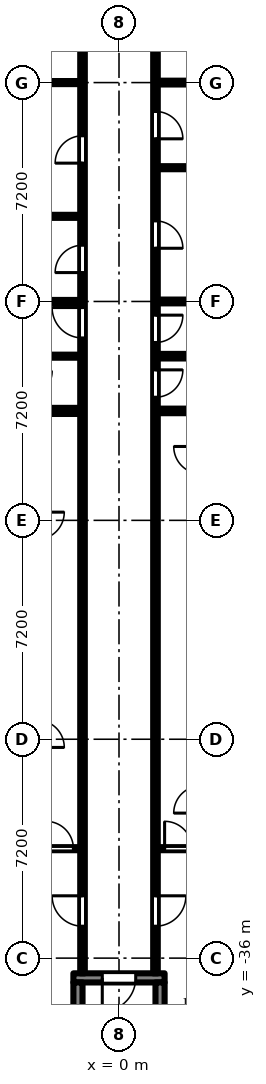
"""IFC4 building model, lengths in metres.
Left out: names, types, materials, properties, quantities, classifications, styles, units other than length and angle.
Written with IfcOpenShell. Run it as: python <this file> out.ifc"""

import sys

from ifc_helpers import new_model, si_unit, direction, frame, frame_2d, origin, place, context, subcontext, project, spatial, rectangle, extrude, element, fill, save


model = new_model("IFC4")
c1 = context("Model", 3, precision=1e-05, world=origin(), true_north=direction((0.0, 1.0)))
c2 = subcontext(c1, "Body", "Model", "MODEL_VIEW")
j1 = project(units=[si_unit("LENGTHUNIT", "METRE"), si_unit("PLANEANGLEUNIT", "RADIAN")], contexts=[c1])
p1 = place(None, origin())
s1 = spatial("IfcSite", under=j1, at=p1, CompositionType="ELEMENT")
p2 = place(p1, origin())
s2 = spatial("IfcBuilding", under=s1, at=p2, CompositionType="ELEMENT")
p3 = place(p2, frame((0.0, 0.0, 53.7)))
s3 = spatial("IfcBuildingStorey", under=s2, at=p3, CompositionType="ELEMENT", Elevation=53.7)
p4 = place(p3, frame((-1.5, -36.65, 0.0), z_axis=(0.0, 0.0, 1.0), x_axis=(1.0, 0.0, 0.0)))
e1 = element("IfcWall", 1, at=p4, inside=s3, PredefinedType="SHEAR", context=c2, shape_type="SweptSolid", body=[
    extrude(rectangle(XDim=3.0, YDim=0.3, at=frame_2d((1.5, 0.0))), origin(), (0.0, 0.0, 1.0), 2.575),
])
p5 = place(p4, frame((0.95, 0.0, 0.0)))
e2 = element("IfcOpeningElement", 2, at=p5, cuts=e1, PredefinedType="OPENING", context=c2, shape_type="SweptSolid", body=[
    extrude(rectangle(XDim=1.1, YDim=2.1, at=frame_2d((0.55, 1.05))), frame((0.0, 0.16, 0.0), z_axis=(0.0, -1.0, 0.0), x_axis=(1.0, 0.0, 0.0)), (0.0, 0.0, 1.0), 0.32),
])
for number, where, z_axis, x_axis in (
    (3, (-1.35, -36.8, 0.0), (0.0, 0.0, 1.0), (0.0, -1.0, 0.0)),
    (4, (1.35, -36.8, 0.0), (0.0, 0.0, 1.0), (0.0, -1.0, 0.0)),
):
    element("IfcWall", number, at=place(p3, frame(where, z_axis=z_axis, x_axis=x_axis)), inside=s3, PredefinedType="SHEAR", context=c2, shape_type="SweptSolid", body=[
        extrude(rectangle(XDim=5.8, YDim=0.3, at=frame_2d((2.9, 0.0))), origin(), (0.0, 0.0, 1.0), 2.575),
    ])
p6 = place(p3, frame((-6.9, -32.4, 0.0), z_axis=(0.0, 0.0, 1.0), x_axis=(1.0, 0.0, 0.0)))
e5 = element("IfcWall", 5, at=p6, inside=s3, PredefinedType="PARTITIONING", context=c2, shape_type="SweptSolid", body=[
    extrude(rectangle(XDim=5.625, YDim=0.1, at=frame_2d((2.812, 0.0))), origin(), (0.0, 0.0, 1.0), 2.575),
])
p7 = place(p6, frame((4.5, 0.0, 0.0)))
e6 = element("IfcOpeningElement", 6, at=p7, cuts=e5, PredefinedType="OPENING", context=c2, shape_type="SweptSolid", body=[
    extrude(rectangle(XDim=0.9, YDim=2.1, at=frame_2d((0.45, 1.05))), frame((0.0, 0.06, 0.0), z_axis=(0.0, -1.0, 0.0), x_axis=(1.0, 0.0, 0.0)), (0.0, 0.0, 1.0), 0.12),
])
for number, where, z_axis, x_axis in (
    (7, (-3.9, -14.4, 0.0), (0.0, 0.0, 1.0), (1.0, 0.0, 0.0)),
    (8, (-3.9, -11.6, 0.0), (0.0, 0.0, 1.0), (1.0, 0.0, 0.0)),
    (9, (-3.9, -7.2, 0.0), (0.0, 0.0, 1.0), (1.0, 0.0, 0.0)),
):
    element("IfcWall", number, at=place(p3, frame(where, z_axis=z_axis, x_axis=x_axis)), inside=s3, PredefinedType="PARTITIONING", context=c2, shape_type="SweptSolid", body=[
        extrude(rectangle(XDim=2.625, YDim=0.1, at=frame_2d((1.312, 0.0))), origin(), (0.0, 0.0, 1.0), 2.575),
    ])
p8 = place(p3, frame((-2.95, -16.2, 0.0), z_axis=(0.0, 0.0, 1.0), x_axis=(1.0, 0.0, 0.0)))
e10 = element("IfcWall", 10, at=p8, inside=s3, PredefinedType="PARTITIONING", context=c2, shape_type="SweptSolid", body=[
    extrude(rectangle(XDim=1.675, YDim=0.1, at=frame_2d((0.837, 0.0))), origin(), (0.0, 0.0, 1.0), 2.575),
])
p9 = place(p3, frame((-2.75, -18.0, 0.0), z_axis=(0.0, 0.0, 1.0), x_axis=(1.0, 0.0, 0.0)))
e11 = element("IfcWall", 11, at=p9, inside=s3, PredefinedType="PARTITIONING", context=c2, shape_type="SweptSolid", body=[
    extrude(rectangle(XDim=1.475, YDim=0.2, at=frame_2d((0.738, 0.0))), origin(), (0.0, 0.0, 1.0), 2.575),
])
p10 = place(p3, frame((-1.2, -36.5, 0.0), z_axis=(0.0, 0.0, 1.0), x_axis=(0.0, 1.0, 0.0)))
e12 = element("IfcWall", 12, at=p10, inside=s3, PredefinedType="PARTITIONING", context=c2, shape_type="SweptSolid", body=[
    extrude(rectangle(XDim=35.225, YDim=0.15, at=frame_2d((17.613, 0.0))), origin(), (0.0, 0.0, 1.0), 2.575),
])
p11 = place(p10, frame((31.85, 0.0, 0.0)))
e13 = element("IfcOpeningElement", 13, at=p11, cuts=e12, PredefinedType="OPENING", context=c2, shape_type="SweptSolid", body=[
    extrude(rectangle(XDim=0.9, YDim=2.1, at=frame_2d((0.45, 1.05))), frame((0.0, 0.085, 0.0), z_axis=(0.0, -1.0, 0.0), x_axis=(1.0, 0.0, 0.0)), (0.0, 0.0, 1.0), 0.17),
])
p12 = place(p10, frame((23.05, 0.0, 0.0)))
e14 = element("IfcOpeningElement", 14, at=p12, cuts=e12, PredefinedType="OPENING", context=c2, shape_type="SweptSolid", body=[
    extrude(rectangle(XDim=0.9, YDim=2.1, at=frame_2d((0.45, 1.05))), frame((0.0, 0.085, 0.0), z_axis=(0.0, -1.0, 0.0), x_axis=(1.0, 0.0, 0.0)), (0.0, 0.0, 1.0), 0.17),
])
p13 = place(p10, frame((26.65, 0.0, 0.0)))
e15 = element("IfcOpeningElement", 15, at=p13, cuts=e12, PredefinedType="OPENING", context=c2, shape_type="SweptSolid", body=[
    extrude(rectangle(XDim=0.9, YDim=2.1, at=frame_2d((0.45, 1.05))), frame((0.0, 0.085, 0.0), z_axis=(0.0, -1.0, 0.0), x_axis=(1.0, 0.0, 0.0)), (0.0, 0.0, 1.0), 0.17),
])
p14 = place(p10, frame((20.9, 0.0, 0.0)))
e16 = element("IfcOpeningElement", 16, at=p14, cuts=e12, PredefinedType="OPENING", context=c2, shape_type="SweptSolid", body=[
    extrude(rectangle(XDim=1.0, YDim=2.1, at=frame_2d((0.5, 1.05))), frame((0.0, 0.085, 0.0), z_axis=(0.0, -1.0, 0.0), x_axis=(1.0, 0.0, 0.0)), (0.0, 0.0, 1.0), 0.17),
])
p15 = place(p10, frame((1.55, 0.0, 0.0)))
e17 = element("IfcOpeningElement", 17, at=p15, cuts=e12, PredefinedType="OPENING", context=c2, shape_type="SweptSolid", body=[
    extrude(rectangle(XDim=1.0, YDim=2.1, at=frame_2d((0.5, 1.05))), frame((0.0, 0.085, 0.0), z_axis=(0.0, -1.0, 0.0), x_axis=(1.0, 0.0, 0.0)), (0.0, 0.0, 1.0), 0.17),
])
p16 = place(p3, frame((1.2, -36.5, 0.0), z_axis=(0.0, 0.0, 1.0), x_axis=(0.0, 1.0, 0.0)))
e18 = element("IfcWall", 18, at=p16, inside=s3, PredefinedType="PARTITIONING", context=c2, shape_type="SweptSolid", body=[
    extrude(rectangle(XDim=35.375, YDim=0.15, at=frame_2d((17.688, 0.0))), origin(), (0.0, 0.0, 1.0), 2.575),
])
p17 = place(p16, frame((33.65, 0.0, 0.0)))
e19 = element("IfcOpeningElement", 19, at=p17, cuts=e18, PredefinedType="OPENING", context=c2, shape_type="SweptSolid", body=[
    extrude(rectangle(XDim=0.9, YDim=2.1, at=frame_2d((0.45, 1.05))), frame((0.0, 0.085, 0.0), z_axis=(0.0, -1.0, 0.0), x_axis=(1.0, 0.0, 0.0)), (0.0, 0.0, 1.0), 0.17),
])
p18 = place(p16, frame((30.65, 0.0, 0.0)))
e20 = element("IfcOpeningElement", 20, at=p18, cuts=e18, PredefinedType="OPENING", context=c2, shape_type="SweptSolid", body=[
    extrude(rectangle(XDim=0.9, YDim=2.1, at=frame_2d((0.45, 1.05))), frame((0.0, 0.085, 0.0), z_axis=(0.0, -1.0, 0.0), x_axis=(1.0, 0.0, 0.0)), (0.0, 0.0, 1.0), 0.17),
])
p19 = place(p16, frame((27.45, 0.0, 0.0)))
e21 = element("IfcOpeningElement", 21, at=p19, cuts=e18, PredefinedType="OPENING", context=c2, shape_type="SweptSolid", body=[
    extrude(rectangle(XDim=0.9, YDim=2.1, at=frame_2d((0.45, 1.05))), frame((0.0, 0.085, 0.0), z_axis=(0.0, -1.0, 0.0), x_axis=(1.0, 0.0, 0.0)), (0.0, 0.0, 1.0), 0.17),
])
p20 = place(p16, frame((23.85, 0.0, 0.0)))
e22 = element("IfcOpeningElement", 22, at=p20, cuts=e18, PredefinedType="OPENING", context=c2, shape_type="SweptSolid", body=[
    extrude(rectangle(XDim=0.9, YDim=2.1, at=frame_2d((0.45, 1.05))), frame((0.0, 0.085, 0.0), z_axis=(0.0, -1.0, 0.0), x_axis=(1.0, 0.0, 0.0)), (0.0, 0.0, 1.0), 0.17),
])
p21 = place(p16, frame((20.75, 0.0, 0.0)))
e23 = element("IfcOpeningElement", 23, at=p21, cuts=e18, PredefinedType="OPENING", context=c2, shape_type="SweptSolid", body=[
    extrude(rectangle(XDim=0.9, YDim=2.1, at=frame_2d((0.45, 1.05))), frame((0.0, 0.085, 0.0), z_axis=(0.0, -1.0, 0.0), x_axis=(1.0, 0.0, 0.0)), (0.0, 0.0, 1.0), 0.17),
])
p22 = place(p16, frame((18.95, 0.0, 0.0)))
e24 = element("IfcOpeningElement", 24, at=p22, cuts=e18, PredefinedType="OPENING", context=c2, shape_type="SweptSolid", body=[
    extrude(rectangle(XDim=0.9, YDim=2.1, at=frame_2d((0.45, 1.05))), frame((0.0, 0.085, 0.0), z_axis=(0.0, -1.0, 0.0), x_axis=(1.0, 0.0, 0.0)), (0.0, 0.0, 1.0), 0.17),
])
p23 = place(p16, frame((1.55, 0.0, 0.0)))
e25 = element("IfcOpeningElement", 25, at=p23, cuts=e18, PredefinedType="OPENING", context=c2, shape_type="SweptSolid", body=[
    extrude(rectangle(XDim=1.0, YDim=2.1, at=frame_2d((0.5, 1.05))), frame((0.0, 0.085, 0.0), z_axis=(0.0, -1.0, 0.0), x_axis=(1.0, 0.0, 0.0)), (0.0, 0.0, 1.0), 0.17),
])
p24 = place(p3, frame((1.275, -32.4, 0.0), z_axis=(0.0, 0.0, 1.0), x_axis=(1.0, 0.0, 0.0)))
e26 = element("IfcWall", 26, at=p24, inside=s3, PredefinedType="PARTITIONING", context=c2, shape_type="SweptSolid", body=[
    extrude(rectangle(XDim=5.625, YDim=0.1, at=frame_2d((2.812, 0.0))), origin(), (0.0, 0.0, 1.0), 2.575),
])
p25 = place(p24, frame((0.225, 0.0, 0.0)))
e27 = element("IfcOpeningElement", 27, at=p25, cuts=e26, PredefinedType="OPENING", context=c2, shape_type="SweptSolid", body=[
    extrude(rectangle(XDim=0.9, YDim=2.1, at=frame_2d((0.45, 1.05))), frame((0.0, 0.06, 0.0), z_axis=(0.0, -1.0, 0.0), x_axis=(1.0, 0.0, 0.0)), (0.0, 0.0, 1.0), 0.12),
])
for number, where, z_axis, x_axis in (
    (28, (1.275, -18.0, 0.0), (0.0, 0.0, 1.0), (1.0, 0.0, 0.0)),
    (29, (1.275, -16.2, 0.0), (0.0, 0.0, 1.0), (1.0, 0.0, 0.0)),
):
    element("IfcWall", number, at=place(p3, frame(where, z_axis=z_axis, x_axis=x_axis)), inside=s3, PredefinedType="PARTITIONING", context=c2, shape_type="SweptSolid", body=[
        extrude(rectangle(XDim=5.625, YDim=0.15, at=frame_2d((2.812, 0.0))), origin(), (0.0, 0.0, 1.0), 2.575),
    ])
p26 = place(p3, frame((1.275, -14.4, 0.0), z_axis=(0.0, 0.0, 1.0), x_axis=(1.0, 0.0, 0.0)))
e30 = element("IfcWall", 30, at=p26, inside=s3, PredefinedType="PARTITIONING", context=c2, shape_type="SweptSolid", body=[
    extrude(rectangle(XDim=2.625, YDim=0.125, at=frame_2d((1.312, 0.0))), origin(), (0.0, 0.0, 1.0), 2.575),
])
p27 = place(p3, frame((1.275, -10.0, 0.0), z_axis=(0.0, 0.0, 1.0), x_axis=(1.0, 0.0, 0.0)))
e31 = element("IfcWall", 31, at=p27, inside=s3, PredefinedType="PARTITIONING", context=c2, shape_type="SweptSolid", body=[
    extrude(rectangle(XDim=2.625, YDim=0.1, at=frame_2d((1.312, 0.0))), origin(), (0.0, 0.0, 1.0), 2.575),
])
p28 = place(p3, frame((1.275, -7.2, 0.0), z_axis=(0.0, 0.0, 1.0), x_axis=(1.0, 0.0, 0.0)))
e32 = element("IfcWall", 32, at=p28, inside=s3, PredefinedType="PARTITIONING", context=c2, shape_type="SweptSolid", body=[
    extrude(rectangle(XDim=2.625, YDim=0.125, at=frame_2d((1.312, 0.0))), origin(), (0.0, 0.0, 1.0), 2.575),
])
p29 = place(p5, frame((1.1, 0.0, 0.0), z_axis=(0.0, 0.0, 1.0), x_axis=(-1.0, 0.0, 0.0)))
e33 = element("IfcDoor", 33, at=p29, inside=s3, OperationType="SINGLE_SWING_RIGHT", PredefinedType="DOOR", context=c2, shape_type="SweptSolid", body=[
    extrude(rectangle(XDim=1.1, YDim=2.1, at=frame_2d((0.55, 1.05))), frame((0.0, 0.025, 0.0), z_axis=(0.0, -1.0, 0.0), x_axis=(1.0, 0.0, 0.0)), (0.0, 0.0, 1.0), 0.05),
])
fill(e2, e33)
p30 = place(p19, frame((0.9, 0.0, 0.0), z_axis=(0.0, 0.0, 1.0), x_axis=(-1.0, 0.0, 0.0)))
e34 = element("IfcDoor", 34, at=p30, inside=s3, OperationType="SINGLE_SWING_RIGHT", PredefinedType="DOOR", context=c2, shape_type="SweptSolid", body=[
    extrude(rectangle(XDim=0.9, YDim=2.1, at=frame_2d((0.45, 1.05))), frame((0.0, 0.025, 0.0), z_axis=(0.0, -1.0, 0.0), x_axis=(1.0, 0.0, 0.0)), (0.0, 0.0, 1.0), 0.05),
])
fill(e21, e34)
p31 = place(p20, frame((0.9, 0.0, 0.0), z_axis=(0.0, 0.0, 1.0), x_axis=(-1.0, 0.0, 0.0)))
e35 = element("IfcDoor", 35, at=p31, inside=s3, OperationType="SINGLE_SWING_RIGHT", PredefinedType="DOOR", context=c2, shape_type="SweptSolid", body=[
    extrude(rectangle(XDim=0.9, YDim=2.1, at=frame_2d((0.45, 1.05))), frame((0.0, 0.025, 0.0), z_axis=(0.0, -1.0, 0.0), x_axis=(1.0, 0.0, 0.0)), (0.0, 0.0, 1.0), 0.05),
])
fill(e22, e35)
p32 = place(p21, frame((0.9, 0.0, 0.0), z_axis=(0.0, 0.0, 1.0), x_axis=(-1.0, 0.0, 0.0)))
e36 = element("IfcDoor", 36, at=p32, inside=s3, OperationType="SINGLE_SWING_LEFT", PredefinedType="DOOR", context=c2, shape_type="SweptSolid", body=[
    extrude(rectangle(XDim=0.9, YDim=2.1, at=frame_2d((0.45, 1.05))), frame((0.0, 0.025, 0.0), z_axis=(0.0, -1.0, 0.0), x_axis=(1.0, 0.0, 0.0)), (0.0, 0.0, 1.0), 0.05),
])
fill(e23, e36)
p33 = place(p22, frame((0.9, 0.0, 0.0), z_axis=(0.0, 0.0, 1.0), x_axis=(-1.0, 0.0, 0.0)))
e37 = element("IfcDoor", 37, at=p33, inside=s3, OperationType="SINGLE_SWING_LEFT", PredefinedType="DOOR", context=c2, shape_type="SweptSolid", body=[
    extrude(rectangle(XDim=0.9, YDim=2.1, at=frame_2d((0.45, 1.05))), frame((0.0, 0.025, 0.0), z_axis=(0.0, -1.0, 0.0), x_axis=(1.0, 0.0, 0.0)), (0.0, 0.0, 1.0), 0.05),
])
fill(e24, e37)
p34 = place(p23, frame((1.0, 0.0, 0.0), z_axis=(0.0, 0.0, 1.0), x_axis=(-1.0, 0.0, 0.0)))
e38 = element("IfcDoor", 38, at=p34, inside=s3, OperationType="SINGLE_SWING_LEFT", PredefinedType="DOOR", context=c2, shape_type="SweptSolid", body=[
    extrude(rectangle(XDim=1.0, YDim=2.1, at=frame_2d((0.5, 1.05))), frame((0.0, 0.025, 0.0), z_axis=(0.0, -1.0, 0.0), x_axis=(1.0, 0.0, 0.0)), (0.0, 0.0, 1.0), 0.05),
])
fill(e25, e38)
p35 = place(p25, origin())
e39 = element("IfcDoor", 39, at=p35, inside=s3, OperationType="SINGLE_SWING_LEFT", PredefinedType="DOOR", context=c2, shape_type="SweptSolid", body=[
    extrude(rectangle(XDim=0.9, YDim=2.1, at=frame_2d((0.45, 1.05))), frame((0.0, 0.025, 0.0), z_axis=(0.0, -1.0, 0.0), x_axis=(1.0, 0.0, 0.0)), (0.0, 0.0, 1.0), 0.05),
])
fill(e27, e39)
p36 = place(p12, origin())
e40 = element("IfcDoor", 40, at=p36, inside=s3, OperationType="SINGLE_SWING_LEFT", PredefinedType="DOOR", context=c2, shape_type="SweptSolid", body=[
    extrude(rectangle(XDim=0.9, YDim=2.1, at=frame_2d((0.45, 1.05))), frame((0.0, 0.025, 0.0), z_axis=(0.0, -1.0, 0.0), x_axis=(1.0, 0.0, 0.0)), (0.0, 0.0, 1.0), 0.05),
])
fill(e14, e40)
p37 = place(p13, origin())
e41 = element("IfcDoor", 41, at=p37, inside=s3, OperationType="SINGLE_SWING_LEFT", PredefinedType="DOOR", context=c2, shape_type="SweptSolid", body=[
    extrude(rectangle(XDim=0.9, YDim=2.1, at=frame_2d((0.45, 1.05))), frame((0.0, 0.025, 0.0), z_axis=(0.0, -1.0, 0.0), x_axis=(1.0, 0.0, 0.0)), (0.0, 0.0, 1.0), 0.05),
])
fill(e15, e41)
p38 = place(p14, origin())
e42 = element("IfcDoor", 42, at=p38, inside=s3, OperationType="SINGLE_SWING_RIGHT", PredefinedType="DOOR", context=c2, shape_type="SweptSolid", body=[
    extrude(rectangle(XDim=1.0, YDim=2.1, at=frame_2d((0.5, 1.05))), frame((0.0, 0.025, 0.0), z_axis=(0.0, -1.0, 0.0), x_axis=(1.0, 0.0, 0.0)), (0.0, 0.0, 1.0), 0.05),
])
fill(e16, e42)
p39 = place(p15, origin())
e43 = element("IfcDoor", 43, at=p39, inside=s3, OperationType="SINGLE_SWING_RIGHT", PredefinedType="DOOR", context=c2, shape_type="SweptSolid", body=[
    extrude(rectangle(XDim=1.0, YDim=2.1, at=frame_2d((0.5, 1.05))), frame((0.0, 0.025, 0.0), z_axis=(0.0, -1.0, 0.0), x_axis=(1.0, 0.0, 0.0)), (0.0, 0.0, 1.0), 0.05),
])
fill(e17, e43)
p40 = place(p7, origin())
e44 = element("IfcDoor", 44, at=p40, inside=s3, OperationType="SINGLE_SWING_LEFT", PredefinedType="DOOR", context=c2, shape_type="SweptSolid", body=[
    extrude(rectangle(XDim=0.9, YDim=2.1, at=frame_2d((0.45, 1.05))), frame((0.0, 0.025, 0.0), z_axis=(0.0, -1.0, 0.0), x_axis=(1.0, 0.0, 0.0)), (0.0, 0.0, 1.0), 0.05),
])
fill(e6, e44)
save(model, sys.argv[1])
